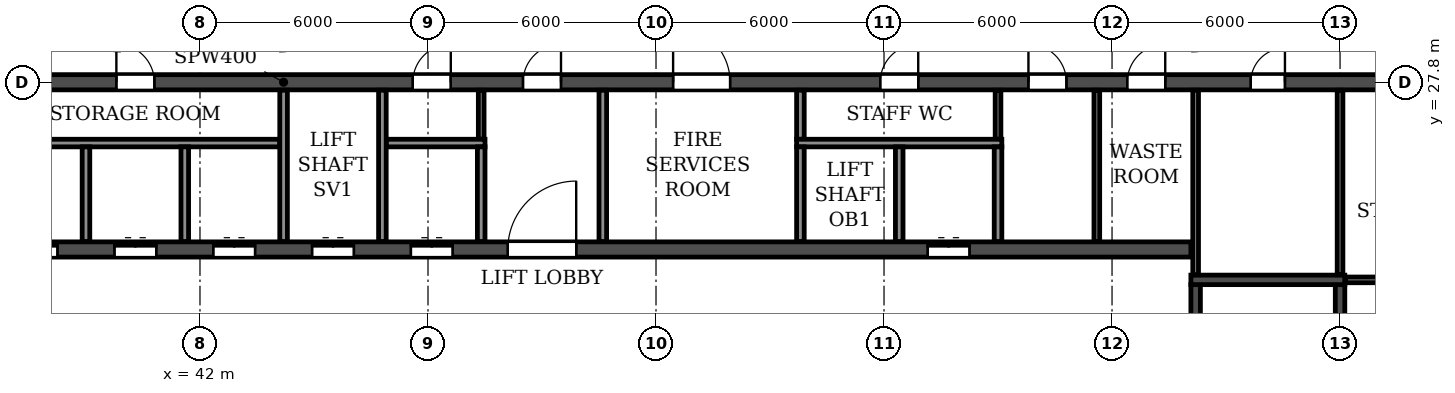
"""IFC4 building model, lengths in metres.
Left out: names, types, materials, properties, quantities, classifications, styles, units other than length and angle.
Written with IfcOpenShell. Run it as: python <this file> out.ifc"""

import sys

from ifc_helpers import new_model, si_unit, direction, frame, frame_2d, origin, place, context, subcontext, project, spatial, rectangle, extrude, element, fill, save


model = new_model("IFC4")
c1 = context("Model", 3, precision=1e-05, world=origin(), true_north=direction((0.0, 1.0)))
c2 = subcontext(c1, "Body", "Model", "MODEL_VIEW")
j1 = project(units=[si_unit("LENGTHUNIT", "METRE"), si_unit("PLANEANGLEUNIT", "RADIAN")], contexts=[c1])
p1 = place(None, origin())
s1 = spatial("IfcSite", under=j1, at=p1, CompositionType="ELEMENT")
p2 = place(p1, origin())
s2 = spatial("IfcBuilding", under=s1, at=p2, CompositionType="ELEMENT")
p3 = place(p2, frame((0.0, 0.0, 211.5)))
s3 = spatial("IfcBuildingStorey", under=s2, at=p3, CompositionType="ELEMENT", Elevation=211.5)
p4 = place(p3, frame((18.2, 27.8, 0.0), z_axis=(0.0, 0.0, 1.0), x_axis=(1.0, 0.0, 0.0)))
e1 = element("IfcWall", 1, at=p4, inside=s3, PredefinedType="SOLIDWALL", context=c2, shape_type="SweptSolid", body=[
    extrude(rectangle(XDim=65.6, YDim=0.4, at=frame_2d((32.8, 0.0))), origin(), (0.0, 0.0, 1.0), 2.95),
])
p5 = place(p4, frame((0.7, 0.0, 0.0)))
e2 = element("IfcOpeningElement", 2, at=p5, cuts=e1, PredefinedType="OPENING", context=c2, shape_type="SweptSolid", body=[
    extrude(rectangle(XDim=1.0, YDim=2.1, at=frame_2d((0.5, 1.05))), frame((0.0, 0.21, 0.0), z_axis=(0.0, -1.0, 0.0), x_axis=(1.0, 0.0, 0.0)), (0.0, 0.0, 1.0), 0.42),
])
p6 = place(p4, frame((4.05, 0.0, 0.0)))
e3 = element("IfcOpeningElement", 3, at=p6, cuts=e1, PredefinedType="OPENING", context=c2, shape_type="SweptSolid", body=[
    extrude(rectangle(XDim=0.9, YDim=2.1, at=frame_2d((0.45, 1.05))), frame((0.0, 0.21, 0.0), z_axis=(0.0, -1.0, 0.0), x_axis=(1.0, 0.0, 0.0)), (0.0, 0.0, 1.0), 0.42),
])
p7 = place(p4, frame((8.65, 0.0, 0.0)))
e4 = element("IfcOpeningElement", 4, at=p7, cuts=e1, PredefinedType="OPENING", context=c2, shape_type="SweptSolid", body=[
    extrude(rectangle(XDim=0.9, YDim=2.1, at=frame_2d((0.45, 1.05))), frame((0.0, 0.21, 0.0), z_axis=(0.0, -1.0, 0.0), x_axis=(1.0, 0.0, 0.0)), (0.0, 0.0, 1.0), 0.42),
])
p8 = place(p4, frame((13.25, 0.0, 0.0)))
e5 = element("IfcOpeningElement", 5, at=p8, cuts=e1, PredefinedType="OPENING", context=c2, shape_type="SweptSolid", body=[
    extrude(rectangle(XDim=0.9, YDim=2.1, at=frame_2d((0.45, 1.05))), frame((0.0, 0.21, 0.0), z_axis=(0.0, -1.0, 0.0), x_axis=(1.0, 0.0, 0.0)), (0.0, 0.0, 1.0), 0.42),
])
p9 = place(p4, frame((16.4, 0.0, 0.0)))
e6 = element("IfcOpeningElement", 6, at=p9, cuts=e1, PredefinedType="OPENING", context=c2, shape_type="SweptSolid", body=[
    extrude(rectangle(XDim=1.0, YDim=2.1, at=frame_2d((0.5, 1.05))), frame((0.0, 0.21, 0.0), z_axis=(0.0, -1.0, 0.0), x_axis=(1.0, 0.0, 0.0)), (0.0, 0.0, 1.0), 0.42),
])
p10 = place(p4, frame((21.6, 0.0, 0.0)))
e7 = element("IfcOpeningElement", 7, at=p10, cuts=e1, PredefinedType="OPENING", context=c2, shape_type="SweptSolid", body=[
    extrude(rectangle(XDim=1.0, YDim=2.1, at=frame_2d((0.5, 1.05))), frame((0.0, 0.21, 0.0), z_axis=(0.0, -1.0, 0.0), x_axis=(1.0, 0.0, 0.0)), (0.0, 0.0, 1.0), 0.42),
])
p11 = place(p4, frame((29.4, 0.0, 0.0)))
e8 = element("IfcOpeningElement", 8, at=p11, cuts=e1, PredefinedType="OPENING", context=c2, shape_type="SweptSolid", body=[
    extrude(rectangle(XDim=1.0, YDim=2.1, at=frame_2d((0.5, 1.05))), frame((0.0, 0.21, 0.0), z_axis=(0.0, -1.0, 0.0), x_axis=(1.0, 0.0, 0.0)), (0.0, 0.0, 1.0), 0.42),
])
p12 = place(p4, frame((32.3, 0.0, 0.0)))
e9 = element("IfcOpeningElement", 9, at=p12, cuts=e1, PredefinedType="OPENING", context=c2, shape_type="SweptSolid", body=[
    extrude(rectangle(XDim=1.0, YDim=2.1, at=frame_2d((0.5, 1.05))), frame((0.0, 0.21, 0.0), z_axis=(0.0, -1.0, 0.0), x_axis=(1.0, 0.0, 0.0)), (0.0, 0.0, 1.0), 0.42),
])
p13 = place(p4, frame((36.25, 0.0, 0.0)))
e10 = element("IfcOpeningElement", 10, at=p13, cuts=e1, PredefinedType="OPENING", context=c2, shape_type="SweptSolid", body=[
    extrude(rectangle(XDim=1.5, YDim=2.1, at=frame_2d((0.75, 1.05))), frame((0.0, 0.21, 0.0), z_axis=(0.0, -1.0, 0.0), x_axis=(1.0, 0.0, 0.0)), (0.0, 0.0, 1.0), 0.42),
])
p14 = place(p4, frame((41.7, 0.0, 0.0)))
e11 = element("IfcOpeningElement", 11, at=p14, cuts=e1, PredefinedType="OPENING", context=c2, shape_type="SweptSolid", body=[
    extrude(rectangle(XDim=1.0, YDim=2.1, at=frame_2d((0.5, 1.05))), frame((0.0, 0.21, 0.0), z_axis=(0.0, -1.0, 0.0), x_axis=(1.0, 0.0, 0.0)), (0.0, 0.0, 1.0), 0.42),
])
p15 = place(p4, frame((45.6, 0.0, 0.0)))
e12 = element("IfcOpeningElement", 12, at=p15, cuts=e1, PredefinedType="OPENING", context=c2, shape_type="SweptSolid", body=[
    extrude(rectangle(XDim=1.0, YDim=2.1, at=frame_2d((0.5, 1.05))), frame((0.0, 0.21, 0.0), z_axis=(0.0, -1.0, 0.0), x_axis=(1.0, 0.0, 0.0)), (0.0, 0.0, 1.0), 0.42),
])
p16 = place(p4, frame((48.2, 0.0, 0.0)))
e13 = element("IfcOpeningElement", 13, at=p16, cuts=e1, PredefinedType="OPENING", context=c2, shape_type="SweptSolid", body=[
    extrude(rectangle(XDim=1.0, YDim=2.1, at=frame_2d((0.5, 1.05))), frame((0.0, 0.21, 0.0), z_axis=(0.0, -1.0, 0.0), x_axis=(1.0, 0.0, 0.0)), (0.0, 0.0, 1.0), 0.42),
])
p17 = place(p4, frame((51.45, 0.0, 0.0)))
e14 = element("IfcOpeningElement", 14, at=p17, cuts=e1, PredefinedType="OPENING", context=c2, shape_type="SweptSolid", body=[
    extrude(rectangle(XDim=0.9, YDim=2.1, at=frame_2d((0.45, 1.05))), frame((0.0, 0.21, 0.0), z_axis=(0.0, -1.0, 0.0), x_axis=(1.0, 0.0, 0.0)), (0.0, 0.0, 1.0), 0.42),
])
p18 = place(p4, frame((56.05, 0.0, 0.0)))
e15 = element("IfcOpeningElement", 15, at=p18, cuts=e1, PredefinedType="OPENING", context=c2, shape_type="SweptSolid", body=[
    extrude(rectangle(XDim=0.9, YDim=2.1, at=frame_2d((0.45, 1.05))), frame((0.0, 0.21, 0.0), z_axis=(0.0, -1.0, 0.0), x_axis=(1.0, 0.0, 0.0)), (0.0, 0.0, 1.0), 0.42),
])
p19 = place(p4, frame((60.65, 0.0, 0.0)))
e16 = element("IfcOpeningElement", 16, at=p19, cuts=e1, PredefinedType="OPENING", context=c2, shape_type="SweptSolid", body=[
    extrude(rectangle(XDim=0.9, YDim=2.1, at=frame_2d((0.45, 1.05))), frame((0.0, 0.21, 0.0), z_axis=(0.0, -1.0, 0.0), x_axis=(1.0, 0.0, 0.0)), (0.0, 0.0, 1.0), 0.42),
])
p20 = place(p4, frame((63.9, 0.0, 0.0)))
e17 = element("IfcOpeningElement", 17, at=p20, cuts=e1, PredefinedType="OPENING", context=c2, shape_type="SweptSolid", body=[
    extrude(rectangle(XDim=1.0, YDim=2.1, at=frame_2d((0.5, 1.05))), frame((0.0, 0.21, 0.0), z_axis=(0.0, -1.0, 0.0), x_axis=(1.0, 0.0, 0.0)), (0.0, 0.0, 1.0), 0.42),
])
p21 = place(p3, frame((33.925, 23.4, 0.0), z_axis=(0.0, 0.0, 1.0), x_axis=(1.0, 0.0, 0.0)))
e18 = element("IfcWall", 18, at=p21, inside=s3, PredefinedType="SOLIDWALL", context=c2, shape_type="SweptSolid", body=[
    extrude(rectangle(XDim=34.15, YDim=0.4, at=frame_2d((17.075, 0.0))), origin(), (0.0, 0.0, 1.0), 2.95),
])
p22 = place(p21, frame((16.175, 0.0, 0.0)))
e19 = element("IfcOpeningElement", 19, at=p22, cuts=e18, PredefinedType="OPENING", context=c2, shape_type="SweptSolid", body=[
    extrude(rectangle(XDim=1.8, YDim=2.1, at=frame_2d((0.9, 1.05))), frame((0.0, 0.21, 0.0), z_axis=(0.0, -1.0, 0.0), x_axis=(1.0, 0.0, 0.0)), (0.0, 0.0, 1.0), 0.42),
])
p23 = place(p21, frame((0.625, 0.0, 0.0)))
e20 = element("IfcOpeningElement", 20, at=p23, cuts=e18, PredefinedType="OPENING", context=c2, shape_type="SweptSolid", body=[
    extrude(rectangle(XDim=1.1, YDim=2.1, at=frame_2d((0.55, 1.05))), frame((0.0, 0.21, 0.0), z_axis=(0.0, -1.0, 0.0), x_axis=(1.0, 0.0, 0.0)), (0.0, 0.0, 1.0), 0.42),
])
p24 = place(p21, frame((3.225, 0.0, 0.0)))
e21 = element("IfcOpeningElement", 21, at=p24, cuts=e18, PredefinedType="OPENING", context=c2, shape_type="SweptSolid", body=[
    extrude(rectangle(XDim=1.1, YDim=2.1, at=frame_2d((0.55, 1.05))), frame((0.0, 0.21, 0.0), z_axis=(0.0, -1.0, 0.0), x_axis=(1.0, 0.0, 0.0)), (0.0, 0.0, 1.0), 0.42),
])
p25 = place(p21, frame((5.825, 0.0, 0.0)))
e22 = element("IfcOpeningElement", 22, at=p25, cuts=e18, PredefinedType="OPENING", context=c2, shape_type="SweptSolid", body=[
    extrude(rectangle(XDim=1.1, YDim=2.1, at=frame_2d((0.55, 1.05))), frame((0.0, 0.21, 0.0), z_axis=(0.0, -1.0, 0.0), x_axis=(1.0, 0.0, 0.0)), (0.0, 0.0, 1.0), 0.42),
])
p26 = place(p21, frame((8.425, 0.0, 0.0)))
e23 = element("IfcOpeningElement", 23, at=p26, cuts=e18, PredefinedType="OPENING", context=c2, shape_type="SweptSolid", body=[
    extrude(rectangle(XDim=1.1, YDim=2.1, at=frame_2d((0.55, 1.05))), frame((0.0, 0.21, 0.0), z_axis=(0.0, -1.0, 0.0), x_axis=(1.0, 0.0, 0.0)), (0.0, 0.0, 1.0), 0.42),
])
p27 = place(p21, frame((11.025, 0.0, 0.0)))
e24 = element("IfcOpeningElement", 24, at=p27, cuts=e18, PredefinedType="OPENING", context=c2, shape_type="SweptSolid", body=[
    extrude(rectangle(XDim=1.1, YDim=2.1, at=frame_2d((0.55, 1.05))), frame((0.0, 0.21, 0.0), z_axis=(0.0, -1.0, 0.0), x_axis=(1.0, 0.0, 0.0)), (0.0, 0.0, 1.0), 0.42),
])
p28 = place(p21, frame((13.625, 0.0, 0.0)))
e25 = element("IfcOpeningElement", 25, at=p28, cuts=e18, PredefinedType="OPENING", context=c2, shape_type="SweptSolid", body=[
    extrude(rectangle(XDim=1.1, YDim=2.1, at=frame_2d((0.55, 1.05))), frame((0.0, 0.21, 0.0), z_axis=(0.0, -1.0, 0.0), x_axis=(1.0, 0.0, 0.0)), (0.0, 0.0, 1.0), 0.42),
])
p29 = place(p21, frame((27.225, 0.0, 0.0)))
e26 = element("IfcOpeningElement", 26, at=p29, cuts=e18, PredefinedType="OPENING", context=c2, shape_type="SweptSolid", body=[
    extrude(rectangle(XDim=1.1, YDim=2.1, at=frame_2d((0.55, 1.05))), frame((0.0, 0.21, 0.0), z_axis=(0.0, -1.0, 0.0), x_axis=(1.0, 0.0, 0.0)), (0.0, 0.0, 1.0), 0.42),
])
p30 = place(p3, frame((68.2, 14.8, 0.0), z_axis=(0.0, 0.0, 1.0), x_axis=(0.0, 1.0, 0.0)))
e27 = element("IfcWall", 27, at=p30, inside=s3, PredefinedType="SOLIDWALL", context=c2, shape_type="SweptSolid", body=[
    extrude(rectangle(XDim=7.675, YDim=0.25, at=frame_2d((3.837, 0.0))), origin(), (0.0, 0.0, 1.0), 2.95),
])
p31 = place(p30, frame((0.5, 0.0, 0.0)))
e28 = element("IfcOpeningElement", 28, at=p31, cuts=e27, PredefinedType="OPENING", context=c2, shape_type="SweptSolid", body=[
    extrude(rectangle(XDim=1.0, YDim=2.1, at=frame_2d((0.5, 1.05))), frame((0.0, 0.135, 0.0), z_axis=(0.0, -1.0, 0.0), x_axis=(1.0, 0.0, 0.0)), (0.0, 0.0, 1.0), 0.27),
])
p32 = place(p3, frame((72.0, 14.8, 0.0), z_axis=(0.0, 0.0, 1.0), x_axis=(0.0, 1.0, 0.0)))
e29 = element("IfcWall", 29, at=p32, inside=s3, PredefinedType="SOLIDWALL", context=c2, shape_type="SweptSolid", body=[
    extrude(rectangle(XDim=7.675, YDim=0.25, at=frame_2d((3.837, 0.0))), origin(), (0.0, 0.0, 1.0), 2.95),
])
p33 = place(p3, frame((68.075, 22.6, 0.0), z_axis=(0.0, 0.0, 1.0), x_axis=(1.0, 0.0, 0.0)))
e30 = element("IfcWall", 30, at=p33, inside=s3, PredefinedType="SOLIDWALL", context=c2, shape_type="SweptSolid", body=[
    extrude(rectangle(XDim=4.05, YDim=0.25, at=frame_2d((2.025, 0.0))), origin(), (0.0, 0.0, 1.0), 2.95),
])
p34 = place(p3, frame((49.4, 26.3, 0.0), z_axis=(0.0, 0.0, 1.0), x_axis=(0.0, 1.0, 0.0)))
e31 = element("IfcWall", 31, at=p34, inside=s3, PredefinedType="PARTITIONING", context=c2, shape_type="SweptSolid", body=[
    extrude(rectangle(XDim=1.29, YDim=0.15, at=frame_2d((0.645, 0.0))), origin(), (0.0, 0.0, 1.0), 2.95),
])
p35 = place(p3, frame((72.135, 22.6, 0.0), z_axis=(0.0, 0.0, 1.0), x_axis=(1.0, 0.0, 0.0)))
e32 = element("IfcWall", 32, at=p35, inside=s3, PredefinedType="PARTITIONING", context=c2, shape_type="SweptSolid", body=[
    extrude(rectangle(XDim=5.13, YDim=0.15, at=frame_2d((2.565, 0.0))), origin(), (0.0, 0.0, 1.0), 2.95),
])
p36 = place(p3, frame((63.0, 26.3, 0.0), z_axis=(0.0, 0.0, 1.0), x_axis=(0.0, 1.0, 0.0)))
e33 = element("IfcWall", 33, at=p36, inside=s3, PredefinedType="PARTITIONING", context=c2, shape_type="SweptSolid", body=[
    extrude(rectangle(XDim=1.29, YDim=0.15, at=frame_2d((0.645, 0.0))), origin(), (0.0, 0.0, 1.0), 2.95),
])
p37 = place(p3, frame((65.6, 23.61, 0.0), z_axis=(0.0, 0.0, 1.0), x_axis=(0.0, 1.0, 0.0)))
e34 = element("IfcWall", 34, at=p37, inside=s3, PredefinedType="PARTITIONING", context=c2, shape_type="SweptSolid", body=[
    extrude(rectangle(XDim=3.98, YDim=0.15, at=frame_2d((1.99, 0.0))), origin(), (0.0, 0.0, 1.0), 2.95),
])
p38 = place(p3, frame((52.6, 23.61, 0.0), z_axis=(0.0, 0.0, 1.0), x_axis=(0.0, 1.0, 0.0)))
e35 = element("IfcWall", 35, at=p38, inside=s3, PredefinedType="PARTITIONING", context=c2, shape_type="SweptSolid", body=[
    extrude(rectangle(XDim=3.98, YDim=0.2, at=frame_2d((1.99, 0.0))), origin(), (0.0, 0.0, 1.0), 2.95),
])
p39 = place(p3, frame((57.8, 26.3, 0.0), z_axis=(0.0, 0.0, 1.0), x_axis=(0.0, 1.0, 0.0)))
e36 = element("IfcWall", 36, at=p39, inside=s3, PredefinedType="PARTITIONING", context=c2, shape_type="SweptSolid", body=[
    extrude(rectangle(XDim=1.29, YDim=0.2, at=frame_2d((0.645, 0.0))), origin(), (0.0, 0.0, 1.0), 2.95),
])
for number, where, z_axis, x_axis in (
    (37, (68.2, 22.735, 0.0), (0.0, 0.0, 1.0), (0.0, 1.0, 0.0)),
    (38, (72.0, 22.735, 0.0), (0.0, 0.0, 1.0), (0.0, 1.0, 0.0)),
):
    element("IfcWall", number, at=place(p3, frame(where, z_axis=z_axis, x_axis=x_axis)), inside=s3, PredefinedType="PARTITIONING", context=c2, shape_type="SweptSolid", body=[
        extrude(rectangle(XDim=4.855, YDim=0.15, at=frame_2d((2.427, 0.0))), origin(), (0.0, 0.0, 1.0), 2.95),
    ])
p40 = place(p3, frame((33.7, 26.2, 0.0), z_axis=(0.0, 0.0, 1.0), x_axis=(1.0, 0.0, 0.0)))
e39 = element("IfcWall", 39, at=p40, inside=s3, PredefinedType="PARTITIONING", context=c2, shape_type="SweptSolid", body=[
    extrude(rectangle(XDim=10.4, YDim=0.2, at=frame_2d((5.2, 0.0))), origin(), (0.0, 0.0, 1.0), 2.95),
])
p41 = place(p3, frame((46.9, 26.2, 0.0), z_axis=(0.0, 0.0, 1.0), x_axis=(1.0, 0.0, 0.0)))
e40 = element("IfcWall", 40, at=p41, inside=s3, PredefinedType="PARTITIONING", context=c2, shape_type="SweptSolid", body=[
    extrude(rectangle(XDim=2.6, YDim=0.2, at=frame_2d((1.3, 0.0))), origin(), (0.0, 0.0, 1.0), 2.95),
])
p42 = place(p3, frame((57.7, 26.2, 0.0), z_axis=(0.0, 0.0, 1.0), x_axis=(1.0, 0.0, 0.0)))
e41 = element("IfcWall", 41, at=p42, inside=s3, PredefinedType="PARTITIONING", context=c2, shape_type="SweptSolid", body=[
    extrude(rectangle(XDim=5.4, YDim=0.2, at=frame_2d((2.7, 0.0))), origin(), (0.0, 0.0, 1.0), 2.95),
])
for number, where, z_axis, x_axis in (
    (42, (39.0, 23.61, 0.0), (0.0, 0.0, 1.0), (0.0, 1.0, 0.0)),
    (43, (41.6, 23.61, 0.0), (0.0, 0.0, 1.0), (0.0, 1.0, 0.0)),
):
    element("IfcWall", number, at=place(p3, frame(where, z_axis=z_axis, x_axis=x_axis)), inside=s3, PredefinedType="PARTITIONING", context=c2, shape_type="SweptSolid", body=[
        extrude(rectangle(XDim=2.49, YDim=0.2, at=frame_2d((1.245, 0.0))), origin(), (0.0, 0.0, 1.0), 2.95),
    ])
for number, where, z_axis, x_axis in (
    (44, (44.2, 23.61, 0.0), (0.0, 0.0, 1.0), (0.0, 1.0, 0.0)),
    (45, (46.8, 23.61, 0.0), (0.0, 0.0, 1.0), (0.0, 1.0, 0.0)),
):
    element("IfcWall", number, at=place(p3, frame(where, z_axis=z_axis, x_axis=x_axis)), inside=s3, PredefinedType="PARTITIONING", context=c2, shape_type="SweptSolid", body=[
        extrude(rectangle(XDim=3.98, YDim=0.2, at=frame_2d((1.99, 0.0))), origin(), (0.0, 0.0, 1.0), 2.95),
    ])
for number, where, z_axis, x_axis in (
    (46, (49.4, 23.61, 0.0), (0.0, 0.0, 1.0), (0.0, 1.0, 0.0)),
    (47, (57.8, 23.61, 0.0), (0.0, 0.0, 1.0), (0.0, 1.0, 0.0)),
    (48, (60.4, 23.61, 0.0), (0.0, 0.0, 1.0), (0.0, 1.0, 0.0)),
    (49, (63.0, 23.61, 0.0), (0.0, 0.0, 1.0), (0.0, 1.0, 0.0)),
):
    element("IfcWall", number, at=place(p3, frame(where, z_axis=z_axis, x_axis=x_axis)), inside=s3, PredefinedType="PARTITIONING", context=c2, shape_type="SweptSolid", body=[
        extrude(rectangle(XDim=2.49, YDim=0.2, at=frame_2d((1.245, 0.0))), origin(), (0.0, 0.0, 1.0), 2.95),
    ])
p43 = place(p10, origin())
e50 = element("IfcDoor", 50, at=p43, inside=s3, OperationType="SINGLE_SWING_LEFT", PredefinedType="DOOR", context=c2, shape_type="SweptSolid", body=[
    extrude(rectangle(XDim=1.0, YDim=2.1, at=frame_2d((0.5, 1.05))), frame((0.0, 0.025, 0.0), z_axis=(0.0, -1.0, 0.0), x_axis=(1.0, 0.0, 0.0)), (0.0, 0.0, 1.0), 0.05),
])
fill(e7, e50)
p44 = place(p11, origin())
e51 = element("IfcDoor", 51, at=p44, inside=s3, OperationType="SINGLE_SWING_RIGHT", PredefinedType="DOOR", context=c2, shape_type="SweptSolid", body=[
    extrude(rectangle(XDim=1.0, YDim=2.1, at=frame_2d((0.5, 1.05))), frame((0.0, 0.025, 0.0), z_axis=(0.0, -1.0, 0.0), x_axis=(1.0, 0.0, 0.0)), (0.0, 0.0, 1.0), 0.05),
])
fill(e8, e51)
p45 = place(p12, origin())
e52 = element("IfcDoor", 52, at=p45, inside=s3, OperationType="SINGLE_SWING_RIGHT", PredefinedType="DOOR", context=c2, shape_type="SweptSolid", body=[
    extrude(rectangle(XDim=1.0, YDim=2.1, at=frame_2d((0.5, 1.05))), frame((0.0, 0.025, 0.0), z_axis=(0.0, -1.0, 0.0), x_axis=(1.0, 0.0, 0.0)), (0.0, 0.0, 1.0), 0.05),
])
fill(e9, e52)
p46 = place(p13, origin())
e53 = element("IfcDoor", 53, at=p46, inside=s3, OperationType="DOUBLE_DOOR_SINGLE_SWING", PredefinedType="DOOR", context=c2, shape_type="SweptSolid", body=[
    extrude(rectangle(XDim=1.5, YDim=2.1, at=frame_2d((0.75, 1.05))), frame((0.0, 0.025, 0.0), z_axis=(0.0, -1.0, 0.0), x_axis=(1.0, 0.0, 0.0)), (0.0, 0.0, 1.0), 0.05),
])
fill(e10, e53)
p47 = place(p14, origin())
e54 = element("IfcDoor", 54, at=p47, inside=s3, OperationType="SINGLE_SWING_RIGHT", PredefinedType="DOOR", context=c2, shape_type="SweptSolid", body=[
    extrude(rectangle(XDim=1.0, YDim=2.1, at=frame_2d((0.5, 1.05))), frame((0.0, 0.025, 0.0), z_axis=(0.0, -1.0, 0.0), x_axis=(1.0, 0.0, 0.0)), (0.0, 0.0, 1.0), 0.05),
])
fill(e11, e54)
p48 = place(p15, origin())
e55 = element("IfcDoor", 55, at=p48, inside=s3, OperationType="SINGLE_SWING_LEFT", PredefinedType="DOOR", context=c2, shape_type="SweptSolid", body=[
    extrude(rectangle(XDim=1.0, YDim=2.1, at=frame_2d((0.5, 1.05))), frame((0.0, 0.025, 0.0), z_axis=(0.0, -1.0, 0.0), x_axis=(1.0, 0.0, 0.0)), (0.0, 0.0, 1.0), 0.05),
])
fill(e12, e55)
p49 = place(p16, origin())
e56 = element("IfcDoor", 56, at=p49, inside=s3, OperationType="SINGLE_SWING_RIGHT", PredefinedType="DOOR", context=c2, shape_type="SweptSolid", body=[
    extrude(rectangle(XDim=1.0, YDim=2.1, at=frame_2d((0.5, 1.05))), frame((0.0, 0.025, 0.0), z_axis=(0.0, -1.0, 0.0), x_axis=(1.0, 0.0, 0.0)), (0.0, 0.0, 1.0), 0.05),
])
fill(e13, e56)
p50 = place(p17, origin())
e57 = element("IfcDoor", 57, at=p50, inside=s3, OperationType="SINGLE_SWING_RIGHT", PredefinedType="DOOR", context=c2, shape_type="SweptSolid", body=[
    extrude(rectangle(XDim=0.9, YDim=2.1, at=frame_2d((0.45, 1.05))), frame((0.0, 0.025, 0.0), z_axis=(0.0, -1.0, 0.0), x_axis=(1.0, 0.0, 0.0)), (0.0, 0.0, 1.0), 0.05),
])
fill(e14, e57)
p51 = place(p22, origin())
e58 = element("IfcDoor", 58, at=p51, inside=s3, OperationType="DOUBLE_DOOR_SINGLE_SWING", PredefinedType="DOOR", context=c2, shape_type="SweptSolid", body=[
    extrude(rectangle(XDim=1.8, YDim=2.1, at=frame_2d((0.9, 1.05))), frame((0.0, 0.025, 0.0), z_axis=(0.0, -1.0, 0.0), x_axis=(1.0, 0.0, 0.0)), (0.0, 0.0, 1.0), 0.05),
])
fill(e19, e58)
p52 = place(p24, origin())
e59 = element("IfcDoor", 59, at=p52, inside=s3, OperationType="DOUBLE_DOOR_SLIDING", PredefinedType="DOOR", context=c2, shape_type="SweptSolid", body=[
    extrude(rectangle(XDim=1.1, YDim=2.1, at=frame_2d((0.55, 1.05))), frame((0.0, 0.025, 0.0), z_axis=(0.0, -1.0, 0.0), x_axis=(1.0, 0.0, 0.0)), (0.0, 0.0, 1.0), 0.05),
])
fill(e21, e59)
p53 = place(p25, origin())
e60 = element("IfcDoor", 60, at=p53, inside=s3, OperationType="DOUBLE_DOOR_SLIDING", PredefinedType="DOOR", context=c2, shape_type="SweptSolid", body=[
    extrude(rectangle(XDim=1.1, YDim=2.1, at=frame_2d((0.55, 1.05))), frame((0.0, 0.025, 0.0), z_axis=(0.0, -1.0, 0.0), x_axis=(1.0, 0.0, 0.0)), (0.0, 0.0, 1.0), 0.05),
])
fill(e22, e60)
p54 = place(p26, origin())
e61 = element("IfcDoor", 61, at=p54, inside=s3, OperationType="DOUBLE_DOOR_SLIDING", PredefinedType="DOOR", context=c2, shape_type="SweptSolid", body=[
    extrude(rectangle(XDim=1.1, YDim=2.1, at=frame_2d((0.55, 1.05))), frame((0.0, 0.025, 0.0), z_axis=(0.0, -1.0, 0.0), x_axis=(1.0, 0.0, 0.0)), (0.0, 0.0, 1.0), 0.05),
])
fill(e23, e61)
p55 = place(p27, origin())
e62 = element("IfcDoor", 62, at=p55, inside=s3, OperationType="DOUBLE_DOOR_SLIDING", PredefinedType="DOOR", context=c2, shape_type="SweptSolid", body=[
    extrude(rectangle(XDim=1.1, YDim=2.1, at=frame_2d((0.55, 1.05))), frame((0.0, 0.025, 0.0), z_axis=(0.0, -1.0, 0.0), x_axis=(1.0, 0.0, 0.0)), (0.0, 0.0, 1.0), 0.05),
])
fill(e24, e62)
p56 = place(p28, origin())
e63 = element("IfcDoor", 63, at=p56, inside=s3, OperationType="DOUBLE_DOOR_SLIDING", PredefinedType="DOOR", context=c2, shape_type="SweptSolid", body=[
    extrude(rectangle(XDim=1.1, YDim=2.1, at=frame_2d((0.55, 1.05))), frame((0.0, 0.025, 0.0), z_axis=(0.0, -1.0, 0.0), x_axis=(1.0, 0.0, 0.0)), (0.0, 0.0, 1.0), 0.05),
])
fill(e25, e63)
p57 = place(p29, origin())
e64 = element("IfcDoor", 64, at=p57, inside=s3, OperationType="DOUBLE_DOOR_SLIDING", PredefinedType="DOOR", context=c2, shape_type="SweptSolid", body=[
    extrude(rectangle(XDim=1.1, YDim=2.1, at=frame_2d((0.55, 1.05))), frame((0.0, 0.025, 0.0), z_axis=(0.0, -1.0, 0.0), x_axis=(1.0, 0.0, 0.0)), (0.0, 0.0, 1.0), 0.05),
])
fill(e26, e64)
save(model, sys.argv[1])
